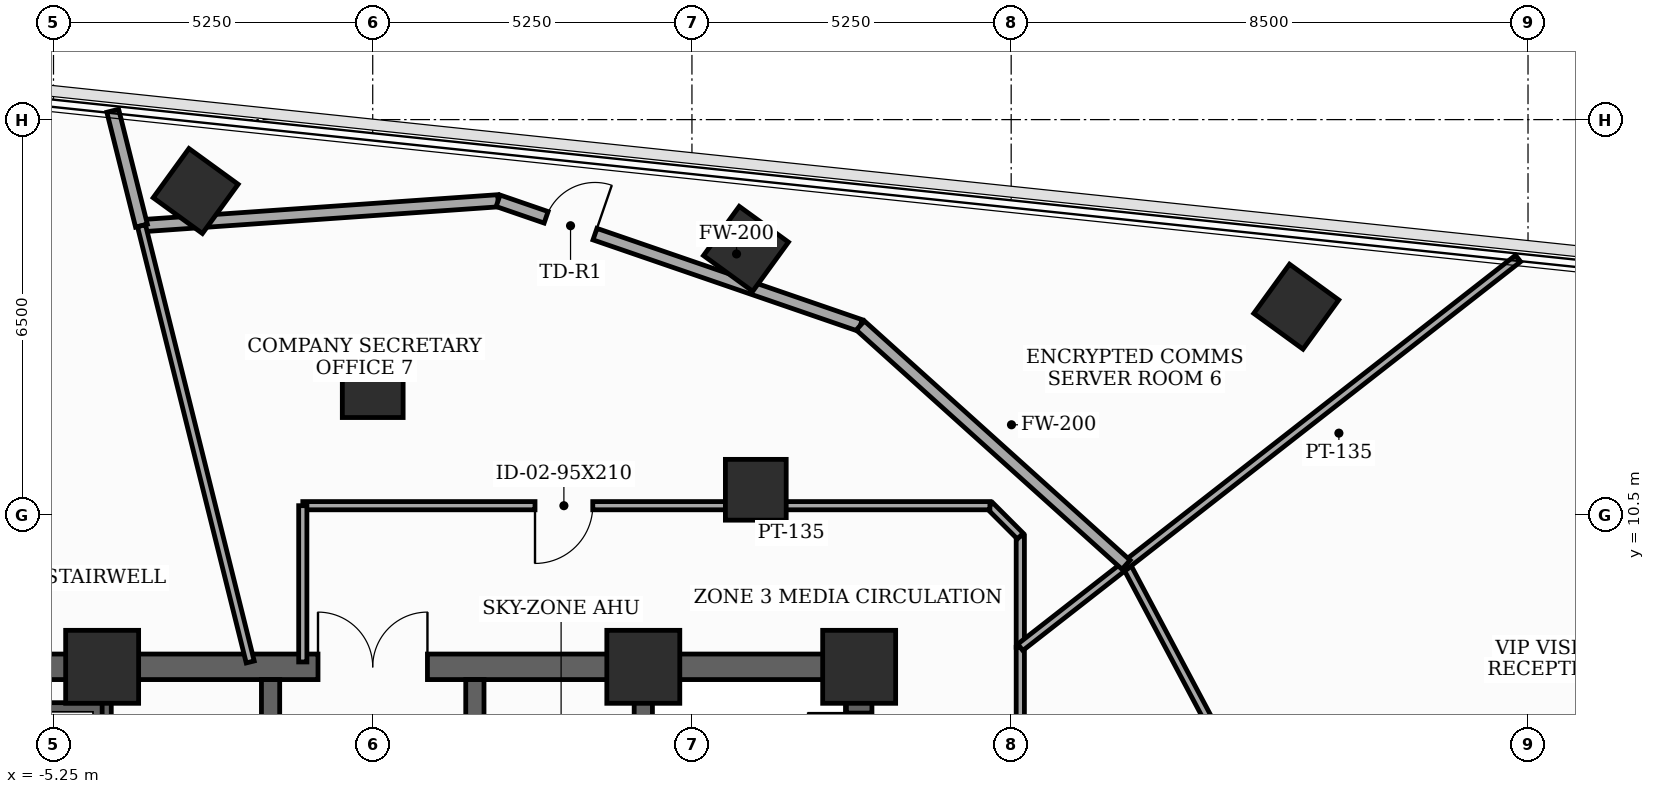
"""IFC4 building model, lengths in metres.
Left out: names, types, materials, properties, quantities, classifications, styles, units other than length and angle.
Written with IfcOpenShell. Run it as: python <this file> out.ifc"""

import sys

from ifc_helpers import new_model, si_unit, direction, frame, frame_2d, origin, origin_2d, place, context, subcontext, project, spatial, rectangle, extrude, element, fill, save


model = new_model("IFC4")
c1 = context("Model", 3, precision=1e-05, world=origin(), true_north=direction((0.0, 1.0)))
c2 = subcontext(c1, "Body", "Model", "MODEL_VIEW")
j1 = project(units=[si_unit("LENGTHUNIT", "METRE"), si_unit("PLANEANGLEUNIT", "RADIAN")], contexts=[c1])
p1 = place(None, origin())
s1 = spatial("IfcSite", under=j1, at=p1, CompositionType="ELEMENT")
p2 = place(p1, origin())
s2 = spatial("IfcBuilding", under=s1, at=p2, CompositionType="ELEMENT")
p3 = place(p2, frame((0.0, 0.0, 226.3)))
s3 = spatial("IfcBuildingStorey", under=s2, at=p3, CompositionType="ELEMENT", Elevation=226.3)
for number, where, z_axis, x_axis in (
    (1, (8.0, 8.0, 0.0), (0.0, 0.0, 1.0), (1.0, 0.0, 0.0)),
    (2, (4.45, 8.0, 0.0), (0.0, 0.0, 1.0), (1.0, 0.0, 0.0)),
    (3, (-4.45, 8.0, 0.0), (0.0, 0.0, 1.0), (1.0, 0.0, 0.0)),
):
    element("IfcColumn", number, at=place(p3, frame(where, z_axis=z_axis, x_axis=x_axis)), inside=s3, PredefinedType="COLUMN", context=c2, shape_type="SweptSolid", body=[
        extrude(rectangle(XDim=1.2, YDim=1.2, at=origin_2d()), origin(), (0.0, 0.0, 1.0), 3.7),
    ])
for number, where, z_axis, x_axis in (
    (4, (6.3, 10.912, 0.0), (0.0, 0.0, 1.0), (1.0, 0.0, 0.0)),
    (5, (0.0, 12.6, 0.0), (0.0, 0.0, 1.0), (1.0, 0.0, 0.0)),
    (6, (15.188, 13.923, 0.0), (0.0, 0.0, 1.0), (0.588, 0.809, 0.0)),
    (7, (6.138, 14.875, 0.0), (0.0, 0.0, 1.0), (0.588, 0.809, 0.0)),
    (8, (-2.912, 15.826, 0.0), (0.0, 0.0, 1.0), (0.588, 0.809, 0.0)),
):
    element("IfcColumn", number, at=place(p3, frame(where, z_axis=z_axis, x_axis=x_axis)), inside=s3, PredefinedType="COLUMN", context=c2, shape_type="SweptSolid", body=[
        extrude(rectangle(XDim=1.0, YDim=1.0, at=origin_2d()), origin(), (0.0, 0.0, 1.0), 3.7),
    ])
p4 = place(p3, frame((8.0, -8.0, 0.0), z_axis=(0.0, 0.0, 1.0), x_axis=(0.0, 1.0, 0.0)))
e9 = element("IfcWall", 9, at=p4, inside=s3, PredefinedType="SHEAR", context=c2, shape_type="SweptSolid", body=[
    extrude(rectangle(XDim=16.0, YDim=0.42, at=frame_2d((8.0, 0.0))), origin(), (0.0, 0.0, 1.0), 3.5),
])
p5 = place(p4, frame((9.6, 0.0, 0.0)))
e10 = element("IfcOpeningElement", 10, at=p5, cuts=e9, PredefinedType="OPENING", context=c2, shape_type="SweptSolid", body=[
    extrude(rectangle(XDim=1.05, YDim=2.15, at=frame_2d((0.525, 1.075))), frame((0.0, 0.22, 0.0), z_axis=(0.0, -1.0, 0.0), x_axis=(1.0, 0.0, 0.0)), (0.0, 0.0, 1.0), 0.44),
])
p6 = place(p4, frame((14.389, 0.0, 0.0)))
e11 = element("IfcOpeningElement", 11, at=p6, cuts=e9, PredefinedType="OPENING", context=c2, shape_type="SweptSolid", body=[
    extrude(rectangle(XDim=0.85, YDim=2.02, at=frame_2d((0.425, 1.01))), frame((0.0, 0.22, 0.0), z_axis=(0.0, -1.0, 0.0), x_axis=(1.0, 0.0, 0.0)), (0.0, 0.0, 1.0), 0.44),
])
p7 = place(p3, frame((-8.0, 8.0, 0.0), z_axis=(0.0, 0.0, 1.0), x_axis=(1.0, 0.0, 0.0)))
e12 = element("IfcWall", 12, at=p7, inside=s3, PredefinedType="SHEAR", context=c2, shape_type="SweptSolid", body=[
    extrude(rectangle(XDim=16.0, YDim=0.42, at=frame_2d((8.0, 0.0))), origin(), (0.0, 0.0, 1.0), 3.5),
])
p8 = place(p7, frame((7.1, 0.0, 0.0)))
e13 = element("IfcOpeningElement", 13, at=p8, cuts=e12, PredefinedType="OPENING", context=c2, shape_type="SweptSolid", body=[
    extrude(rectangle(XDim=1.8, YDim=2.15, at=frame_2d((0.9, 1.075))), frame((0.0, 0.22, 0.0), z_axis=(0.0, -1.0, 0.0), x_axis=(1.0, 0.0, 0.0)), (0.0, 0.0, 1.0), 0.44),
])
for number, where, z_axis, x_axis in (
    (14, (-4.45, -7.79, 0.0), (0.0, 0.0, 1.0), (0.0, 1.0, 0.0)),
    (15, (4.45, -7.79, 0.0), (0.0, 0.0, 1.0), (0.0, 1.0, 0.0)),
):
    element("IfcWall", number, at=place(p3, frame(where, z_axis=z_axis, x_axis=x_axis)), inside=s3, PredefinedType="SHEAR", context=c2, shape_type="SweptSolid", body=[
        extrude(rectangle(XDim=15.58, YDim=0.3, at=frame_2d((7.79, 0.0))), origin(), (0.0, 0.0, 1.0), 3.5),
    ])
p9 = place(p3, frame((-7.79, 7.26, 0.0), z_axis=(0.0, 0.0, 1.0), x_axis=(1.0, 0.0, 0.0)))
e16 = element("IfcWall", 16, at=p9, inside=s3, PredefinedType="SHEAR", context=c2, shape_type="SweptSolid", body=[
    extrude(rectangle(XDim=3.34, YDim=0.3, at=frame_2d((1.67, 0.0))), origin(), (0.0, 0.0, 1.0), 3.5),
])
p10 = place(p3, frame((-1.68, -4.85, 0.0), z_axis=(0.0, 0.0, 1.0), x_axis=(0.0, 1.0, 0.0)))
e17 = element("IfcWall", 17, at=p10, inside=s3, PredefinedType="SHEAR", context=c2, shape_type="SweptSolid", body=[
    extrude(rectangle(XDim=12.64, YDim=0.3, at=frame_2d((6.32, 0.0))), origin(), (0.0, 0.0, 1.0), 3.5),
])
p11 = place(p10, frame((1.65, 0.0, 0.0)))
e18 = element("IfcOpeningElement", 18, at=p11, cuts=e17, PredefinedType="OPENING", context=c2, shape_type="SweptSolid", body=[
    extrude(rectangle(XDim=0.95, YDim=2.1, at=frame_2d((0.475, 1.05))), frame((0.0, 0.16, 0.0), z_axis=(0.0, -1.0, 0.0), x_axis=(1.0, 0.0, 0.0)), (0.0, 0.0, 1.0), 0.32),
])
p12 = place(p10, frame((5.9, 0.0, 0.0)))
e19 = element("IfcOpeningElement", 19, at=p12, cuts=e17, PredefinedType="OPENING", context=c2, shape_type="SweptSolid", body=[
    extrude(rectangle(XDim=0.95, YDim=2.1, at=frame_2d((0.475, 1.05))), frame((0.0, 0.16, 0.0), z_axis=(0.0, -1.0, 0.0), x_axis=(1.0, 0.0, 0.0)), (0.0, 0.0, 1.0), 0.32),
])
p13 = place(p10, frame((10.1, 0.0, 0.0)))
e20 = element("IfcOpeningElement", 20, at=p13, cuts=e17, PredefinedType="OPENING", context=c2, shape_type="SweptSolid", body=[
    extrude(rectangle(XDim=0.95, YDim=2.1, at=frame_2d((0.475, 1.05))), frame((0.0, 0.16, 0.0), z_axis=(0.0, -1.0, 0.0), x_axis=(1.0, 0.0, 0.0)), (0.0, 0.0, 1.0), 0.32),
])
p14 = place(p3, frame((1.68, -4.85, 0.0), z_axis=(0.0, 0.0, 1.0), x_axis=(0.0, 1.0, 0.0)))
e21 = element("IfcWall", 21, at=p14, inside=s3, PredefinedType="SHEAR", context=c2, shape_type="SweptSolid", body=[
    extrude(rectangle(XDim=12.64, YDim=0.3, at=frame_2d((6.32, 0.0))), origin(), (0.0, 0.0, 1.0), 3.5),
])
p15 = place(p14, frame((0.55, 0.0, 0.0)))
e22 = element("IfcOpeningElement", 22, at=p15, cuts=e21, PredefinedType="OPENING", context=c2, shape_type="SweptSolid", body=[
    extrude(rectangle(XDim=1.1, YDim=2.1, at=frame_2d((0.55, 1.05))), frame((0.0, 0.16, 0.0), z_axis=(0.0, -1.0, 0.0), x_axis=(1.0, 0.0, 0.0)), (0.0, 0.0, 1.0), 0.32),
])
p16 = place(p14, frame((2.65, 0.0, 0.0)))
e23 = element("IfcOpeningElement", 23, at=p16, cuts=e21, PredefinedType="OPENING", context=c2, shape_type="SweptSolid", body=[
    extrude(rectangle(XDim=1.1, YDim=2.1, at=frame_2d((0.55, 1.05))), frame((0.0, 0.16, 0.0), z_axis=(0.0, -1.0, 0.0), x_axis=(1.0, 0.0, 0.0)), (0.0, 0.0, 1.0), 0.32),
])
p17 = place(p14, frame((4.75, 0.0, 0.0)))
e24 = element("IfcOpeningElement", 24, at=p17, cuts=e21, PredefinedType="OPENING", context=c2, shape_type="SweptSolid", body=[
    extrude(rectangle(XDim=1.1, YDim=2.1, at=frame_2d((0.55, 1.05))), frame((0.0, 0.16, 0.0), z_axis=(0.0, -1.0, 0.0), x_axis=(1.0, 0.0, 0.0)), (0.0, 0.0, 1.0), 0.32),
])
p18 = place(p14, frame((8.9, 0.0, 0.0)))
e25 = element("IfcOpeningElement", 25, at=p18, cuts=e21, PredefinedType="OPENING", context=c2, shape_type="SweptSolid", body=[
    extrude(rectangle(XDim=0.95, YDim=2.1, at=frame_2d((0.475, 1.05))), frame((0.0, 0.16, 0.0), z_axis=(0.0, -1.0, 0.0), x_axis=(1.0, 0.0, 0.0)), (0.0, 0.0, 1.0), 0.32),
])
p19 = place(p3, frame((10.65, 4.225, 0.0), z_axis=(0.0, 0.0, 1.0), x_axis=(0.0, 1.0, 0.0)))
e26 = element("IfcWall", 26, at=p19, inside=s3, PredefinedType="PARTITIONING", context=c2, shape_type="SweptSolid", body=[
    extrude(rectangle(XDim=4.096, YDim=0.135, at=frame_2d((2.048, 0.0))), origin(), (0.0, 0.0, 1.0), 2.885),
])
p20 = place(p3, frame((10.65, 8.321, 0.0), z_axis=(0.0, 0.0, 1.0), x_axis=(0.0, 1.0, 0.0)))
e27 = element("IfcWall", 27, at=p20, inside=s3, PredefinedType="PARTITIONING", context=c2, shape_type="SweptSolid", body=[
    extrude(rectangle(XDim=1.829, YDim=0.135, at=frame_2d((0.915, 0.0))), origin(), (0.0, 0.0, 1.0), 3.5),
])
p21 = place(p3, frame((10.65, 10.15, 0.0), z_axis=(0.0, 0.0, 1.0), x_axis=(-0.707106781187, 0.707106781187, 0.0)))
e28 = element("IfcWall", 28, at=p21, inside=s3, PredefinedType="PARTITIONING", context=c2, shape_type="SweptSolid", body=[
    extrude(rectangle(XDim=0.707, YDim=0.135, at=frame_2d((0.354, 0.0))), origin(), (0.0, 0.0, 1.0), 3.5),
])
p22 = place(p3, frame((10.15, 10.65, 0.0), z_axis=(0.0, 0.0, 1.0), x_axis=(-1.0, 0.0, 0.0)))
e29 = element("IfcWall", 29, at=p22, inside=s3, PredefinedType="PARTITIONING", context=c2, shape_type="SweptSolid", body=[
    extrude(rectangle(XDim=11.3, YDim=0.135, at=frame_2d((5.65, 0.0))), origin(), (0.0, 0.0, 1.0), 2.885),
])
p23 = place(p22, frame((6.531, 0.0, 0.0)))
e30 = element("IfcOpeningElement", 30, at=p23, cuts=e29, PredefinedType="OPENING", context=c2, shape_type="SweptSolid", body=[
    extrude(rectangle(XDim=0.95, YDim=2.1, at=frame_2d((0.475, 1.05))), frame((0.0, 0.077, 0.0), z_axis=(0.0, -1.0, 0.0), x_axis=(1.0, 0.0, 0.0)), (0.0, 0.0, 1.0), 0.155),
])
p24 = place(p3, frame((-1.15, 10.65, 0.0), z_axis=(0.0, 0.0, 1.0), x_axis=(0.0, -1.0, 0.0)))
e31 = element("IfcWall", 31, at=p24, inside=s3, PredefinedType="PARTITIONING", context=c2, shape_type="SweptSolid", body=[
    extrude(rectangle(XDim=2.57, YDim=0.135, at=frame_2d((1.285, 0.0))), origin(), (0.0, 0.0, 1.0), 2.885),
])
p25 = place(p3, frame((15.149, 4.487, 0.0), z_axis=(0.0, 0.0, 1.0), x_axis=(-0.469396049876, 0.882987739643, 0.0)))
e32 = element("IfcWall", 32, at=p25, inside=s3, PredefinedType="PARTITIONING", context=c2, shape_type="SweptSolid", body=[
    extrude(rectangle(XDim=5.88, YDim=0.135, at=frame_2d((2.94, 0.0))), origin(), (0.0, 0.0, 1.0), 2.985),
])
p26 = place(p3, frame((12.389, 9.679, 0.0), z_axis=(0.0, 0.0, 1.0), x_axis=(-0.788177008199, -0.615448619908, 0.0)))
e33 = element("IfcWall", 33, at=p26, inside=s3, PredefinedType="PARTITIONING", context=c2, shape_type="SweptSolid", body=[
    extrude(rectangle(XDim=2.206, YDim=0.135, at=frame_2d((1.103, 0.0))), origin(), (0.0, 0.0, 1.0), 3.5),
])
p27 = place(p3, frame((18.836, 14.716, 0.0), z_axis=(0.0, 0.0, 1.0), x_axis=(-0.78799903942, -0.615676468507, 0.0)))
e34 = element("IfcWall", 34, at=p27, inside=s3, PredefinedType="PARTITIONING", context=c2, shape_type="SweptSolid", body=[
    extrude(rectangle(XDim=8.182, YDim=0.135, at=frame_2d((4.091, 0.0))), origin(), (0.0, 0.0, 1.0), 2.985),
])
p28 = place(p3, frame((-3.803, 15.255, 0.0), z_axis=(0.0, 0.0, 1.0), x_axis=(0.997563622011, 0.069762597718, 0.0)))
e35 = element("IfcWall", 35, at=p28, inside=s3, PredefinedType="SOLIDWALL", context=c2, shape_type="SweptSolid", body=[
    extrude(rectangle(XDim=5.879, YDim=0.2, at=frame_2d((2.94, 0.0))), origin(), (0.0, 0.0, 1.0), 2.985),
])
p29 = place(p3, frame((2.062, 15.665, 0.0), z_axis=(0.0, 0.0, 1.0), x_axis=(0.94552565825, -0.32554758422, 0.0)))
e36 = element("IfcWall", 36, at=p29, inside=s3, PredefinedType="SOLIDWALL", context=c2, shape_type="SweptSolid", body=[
    extrude(rectangle(XDim=6.3, YDim=0.2, at=frame_2d((3.15, 0.0))), origin(), (0.0, 0.0, 1.0), 2.985),
])
p30 = place(p29, frame((0.835, 0.0, 0.0)))
e37 = element("IfcOpeningElement", 37, at=p30, cuts=e36, PredefinedType="OPENING", context=c2, shape_type="SweptSolid", body=[
    extrude(rectangle(XDim=0.85, YDim=2.02, at=frame_2d((0.425, 1.01))), frame((0.0, 0.11, 0.0), z_axis=(0.0, -1.0, 0.0), x_axis=(1.0, 0.0, 0.0)), (0.0, 0.0, 1.0), 0.22),
])
p31 = place(p3, frame((8.019, 13.614, 0.0), z_axis=(0.0, 0.0, 1.0), x_axis=(0.743110388877, -0.669168850099, 0.0)))
e38 = element("IfcWall", 38, at=p31, inside=s3, PredefinedType="SOLIDWALL", context=c2, shape_type="SweptSolid", body=[
    extrude(rectangle(XDim=5.881, YDim=0.2, at=frame_2d((2.94, 0.0))), origin(), (0.0, 0.0, 1.0), 3.5),
])
p32 = place(p3, frame((-4.275, 17.146, 0.0), z_axis=(0.0, 0.0, 1.0), x_axis=(0.242417712213, -0.970171970738, 0.0)))
e39 = element("IfcWall", 39, at=p32, inside=s3, PredefinedType="SOLIDWALL", context=c2, shape_type="SweptSolid", body=[
    extrude(rectangle(XDim=1.949, YDim=0.2, at=frame_2d((0.974, 0.0))), origin(), (0.0, 0.0, 1.0), 3.035),
])
p33 = place(p3, frame((-3.803, 15.255, 0.0), z_axis=(0.0, 0.0, 1.0), x_axis=(0.241851911951, -0.970313172479, 0.0)))
e40 = element("IfcWall", 40, at=p33, inside=s3, PredefinedType="PARTITIONING", context=c2, shape_type="SweptSolid", body=[
    extrude(rectangle(XDim=7.394, YDim=0.135, at=frame_2d((3.697, 0.0))), origin(), (0.0, 0.0, 1.0), 2.885),
])
p34 = place(p6, origin())
e41 = element("IfcDoor", 41, at=p34, inside=s3, OperationType="SINGLE_SWING_RIGHT", PredefinedType="TRAPDOOR", context=c2, shape_type="SweptSolid", body=[
    extrude(rectangle(XDim=0.85, YDim=2.02, at=frame_2d((0.425, 1.01))), frame((0.0, 0.025, 0.0), z_axis=(0.0, -1.0, 0.0), x_axis=(1.0, 0.0, 0.0)), (0.0, 0.0, 1.0), 0.05),
])
fill(e11, e41)
p35 = place(p8, origin())
e42 = element("IfcDoor", 42, at=p35, inside=s3, OperationType="DOUBLE_DOOR_SINGLE_SWING", PredefinedType="DOOR", context=c2, shape_type="SweptSolid", body=[
    extrude(rectangle(XDim=1.8, YDim=2.15, at=frame_2d((0.9, 1.075))), frame((0.0, 0.025, 0.0), z_axis=(0.0, -1.0, 0.0), x_axis=(1.0, 0.0, 0.0)), (0.0, 0.0, 1.0), 0.05),
])
fill(e13, e42)
p36 = place(p23, origin())
e43 = element("IfcDoor", 43, at=p36, inside=s3, OperationType="SINGLE_SWING_RIGHT", PredefinedType="DOOR", context=c2, shape_type="SweptSolid", body=[
    extrude(rectangle(XDim=0.95, YDim=2.1, at=frame_2d((0.475, 1.05))), frame((0.0, 0.025, 0.0), z_axis=(0.0, -1.0, 0.0), x_axis=(1.0, 0.0, 0.0)), (0.0, 0.0, 1.0), 0.05),
])
fill(e30, e43)
p37 = place(p30, origin())
e44 = element("IfcDoor", 44, at=p37, inside=s3, OperationType="SINGLE_SWING_RIGHT", PredefinedType="TRAPDOOR", context=c2, shape_type="SweptSolid", body=[
    extrude(rectangle(XDim=0.85, YDim=2.02, at=frame_2d((0.425, 1.01))), frame((0.0, 0.025, 0.0), z_axis=(0.0, -1.0, 0.0), x_axis=(1.0, 0.0, 0.0)), (0.0, 0.0, 1.0), 0.05),
])
fill(e37, e44)
save(model, sys.argv[1])
